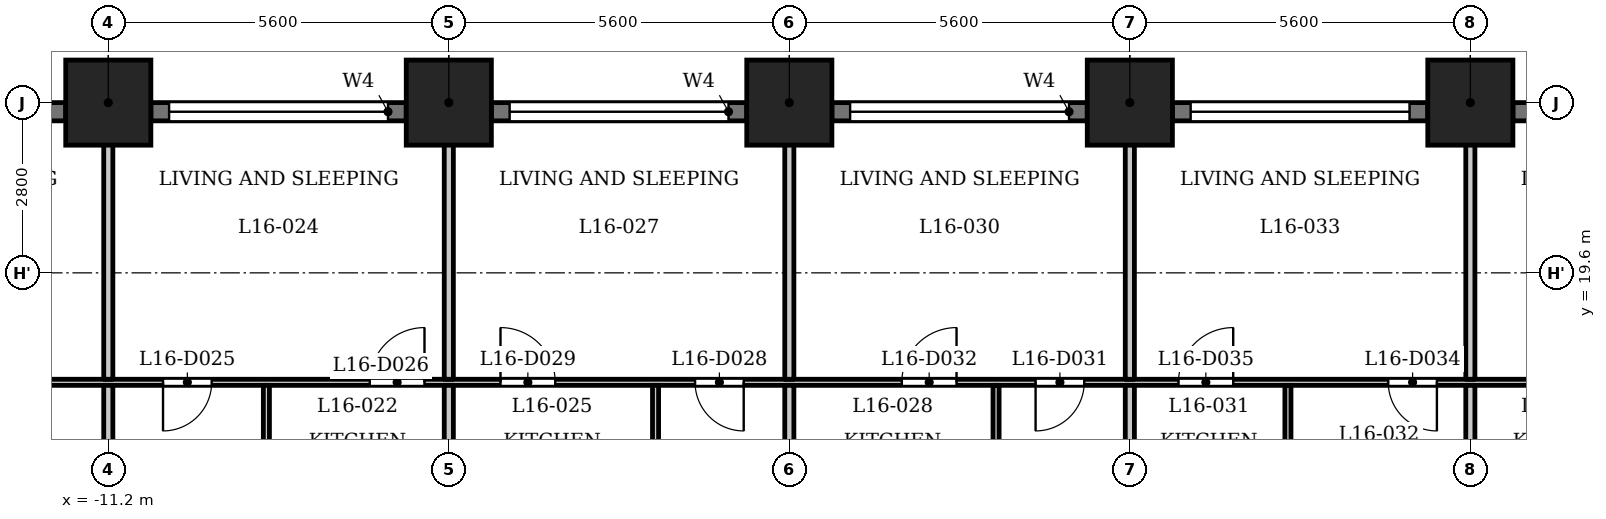
"""IFC4 building model, lengths in metres.
Left out: names, types, materials, properties, quantities, classifications, styles, units other than length and angle.
Written with IfcOpenShell. Run it as: python <this file> out.ifc"""

import sys

from ifc_helpers import new_model, si_unit, direction, frame, frame_2d, origin, origin_2d, place, context, subcontext, project, spatial, rectangle, extrude, element, fill, save


model = new_model("IFC4")
c1 = context("Model", 3, precision=1e-05, world=origin(), true_north=direction((0.0, 1.0)))
c2 = subcontext(c1, "Body", "Model", "MODEL_VIEW")
j1 = project(units=[si_unit("LENGTHUNIT", "METRE"), si_unit("PLANEANGLEUNIT", "RADIAN")], contexts=[c1])
p1 = place(None, origin())
s1 = spatial("IfcSite", under=j1, at=p1, CompositionType="ELEMENT")
p2 = place(p1, origin())
s2 = spatial("IfcBuilding", under=s1, at=p2, CompositionType="ELEMENT")
p3 = place(p2, frame((0.0, 0.0, 65.5)))
s3 = spatial("IfcBuildingStorey", under=s2, at=p3, CompositionType="ELEMENT", Elevation=65.5)
for number, where, z_axis, x_axis in (
    (1, (11.2, 22.4, 0.0), (0.0, 0.0, 1.0), (1.0, 0.0, 0.0)),
    (2, (5.6, 22.4, 0.0), (0.0, 0.0, 1.0), (1.0, 0.0, 0.0)),
    (3, (0.0, 22.4, 0.0), (0.0, 0.0, 1.0), (1.0, 0.0, 0.0)),
    (4, (-5.6, 22.4, 0.0), (0.0, 0.0, 1.0), (1.0, 0.0, 0.0)),
    (5, (-11.2, 22.4, 0.0), (0.0, 0.0, 1.0), (1.0, 0.0, 0.0)),
):
    element("IfcColumn", number, at=place(p3, frame(where, z_axis=z_axis, x_axis=x_axis)), inside=s3, PredefinedType="COLUMN", context=c2, shape_type="SweptSolid", body=[
        extrude(rectangle(XDim=1.4, YDim=1.4, at=origin_2d()), origin(), (0.0, 0.0, 1.0), 3.5),
    ])
p4 = place(p3, frame((16.1, 22.25, 0.0), z_axis=(0.0, 0.0, 1.0), x_axis=(-1.0, 0.0, 0.0)))
e6 = element("IfcWall", 6, at=p4, inside=s3, PredefinedType="SOLIDWALL", context=c2, shape_type="SweptSolid", body=[
    extrude(rectangle(XDim=4.2, YDim=0.3, at=frame_2d((2.1, 0.0))), origin(), (0.0, 0.0, 1.0), 2.35),
])
p5 = place(p4, frame((0.3, 0.0, 1.2)))
e7 = element("IfcOpeningElement", 7, at=p5, cuts=e6, PredefinedType="OPENING", context=c2, shape_type="SweptSolid", body=[
    extrude(rectangle(XDim=3.6, YDim=0.95, at=frame_2d((1.8, 0.475))), frame((0.0, 0.16, 0.0), z_axis=(0.0, -1.0, 0.0), x_axis=(1.0, 0.0, 0.0)), (0.0, 0.0, 1.0), 0.32),
])
p6 = place(p3, frame((10.5, 22.25, 0.0), z_axis=(0.0, 0.0, 1.0), x_axis=(-1.0, 0.0, 0.0)))
e8 = element("IfcWall", 8, at=p6, inside=s3, PredefinedType="SOLIDWALL", context=c2, shape_type="SweptSolid", body=[
    extrude(rectangle(XDim=4.2, YDim=0.3, at=frame_2d((2.1, 0.0))), origin(), (0.0, 0.0, 1.0), 2.35),
])
p7 = place(p6, frame((0.3, 0.0, 1.2)))
e9 = element("IfcOpeningElement", 9, at=p7, cuts=e8, PredefinedType="OPENING", context=c2, shape_type="SweptSolid", body=[
    extrude(rectangle(XDim=3.6, YDim=0.95, at=frame_2d((1.8, 0.475))), frame((0.0, 0.16, 0.0), z_axis=(0.0, -1.0, 0.0), x_axis=(1.0, 0.0, 0.0)), (0.0, 0.0, 1.0), 0.32),
])
p8 = place(p3, frame((4.9, 22.25, 0.0), z_axis=(0.0, 0.0, 1.0), x_axis=(-1.0, 0.0, 0.0)))
e10 = element("IfcWall", 10, at=p8, inside=s3, PredefinedType="SOLIDWALL", context=c2, shape_type="SweptSolid", body=[
    extrude(rectangle(XDim=4.2, YDim=0.3, at=frame_2d((2.1, 0.0))), origin(), (0.0, 0.0, 1.0), 2.35),
])
p9 = place(p8, frame((0.3, 0.0, 1.2)))
e11 = element("IfcOpeningElement", 11, at=p9, cuts=e10, PredefinedType="OPENING", context=c2, shape_type="SweptSolid", body=[
    extrude(rectangle(XDim=3.6, YDim=0.95, at=frame_2d((1.8, 0.475))), frame((0.0, 0.16, 0.0), z_axis=(0.0, -1.0, 0.0), x_axis=(1.0, 0.0, 0.0)), (0.0, 0.0, 1.0), 0.32),
])
p10 = place(p3, frame((-0.7, 22.25, 0.0), z_axis=(0.0, 0.0, 1.0), x_axis=(-1.0, 0.0, 0.0)))
e12 = element("IfcWall", 12, at=p10, inside=s3, PredefinedType="SOLIDWALL", context=c2, shape_type="SweptSolid", body=[
    extrude(rectangle(XDim=4.2, YDim=0.3, at=frame_2d((2.1, 0.0))), origin(), (0.0, 0.0, 1.0), 2.35),
])
p11 = place(p10, frame((0.3, 0.0, 1.2)))
e13 = element("IfcOpeningElement", 13, at=p11, cuts=e12, PredefinedType="OPENING", context=c2, shape_type="SweptSolid", body=[
    extrude(rectangle(XDim=3.6, YDim=0.95, at=frame_2d((1.8, 0.475))), frame((0.0, 0.16, 0.0), z_axis=(0.0, -1.0, 0.0), x_axis=(1.0, 0.0, 0.0)), (0.0, 0.0, 1.0), 0.32),
])
p12 = place(p3, frame((-6.3, 22.25, 0.0), z_axis=(0.0, 0.0, 1.0), x_axis=(-1.0, 0.0, 0.0)))
e14 = element("IfcWall", 14, at=p12, inside=s3, PredefinedType="SOLIDWALL", context=c2, shape_type="SweptSolid", body=[
    extrude(rectangle(XDim=4.2, YDim=0.3, at=frame_2d((2.1, 0.0))), origin(), (0.0, 0.0, 1.0), 2.35),
])
p13 = place(p12, frame((0.3, 0.0, 1.2)))
e15 = element("IfcOpeningElement", 15, at=p13, cuts=e14, PredefinedType="OPENING", context=c2, shape_type="SweptSolid", body=[
    extrude(rectangle(XDim=3.6, YDim=0.95, at=frame_2d((1.8, 0.475))), frame((0.0, 0.16, 0.0), z_axis=(0.0, -1.0, 0.0), x_axis=(1.0, 0.0, 0.0)), (0.0, 0.0, 1.0), 0.32),
])
p14 = place(p3, frame((-11.9, 22.25, 0.0), z_axis=(0.0, 0.0, 1.0), x_axis=(-1.0, 0.0, 0.0)))
e16 = element("IfcWall", 16, at=p14, inside=s3, PredefinedType="SOLIDWALL", context=c2, shape_type="SweptSolid", body=[
    extrude(rectangle(XDim=4.2, YDim=0.3, at=frame_2d((2.1, 0.0))), origin(), (0.0, 0.0, 1.0), 2.35),
])
p15 = place(p14, frame((0.3, 0.0, 1.2)))
e17 = element("IfcOpeningElement", 17, at=p15, cuts=e16, PredefinedType="OPENING", context=c2, shape_type="SweptSolid", body=[
    extrude(rectangle(XDim=3.6, YDim=0.95, at=frame_2d((1.8, 0.475))), frame((0.0, 0.16, 0.0), z_axis=(0.0, -1.0, 0.0), x_axis=(1.0, 0.0, 0.0)), (0.0, 0.0, 1.0), 0.32),
])
p16 = place(p3, frame((-26.64, 17.8, 0.0), z_axis=(0.0, 0.0, 1.0), x_axis=(1.0, 0.0, 0.0)))
e18 = element("IfcWall", 18, at=p16, inside=s3, PredefinedType="PARTITIONING", context=c2, shape_type="SweptSolid", body=[
    extrude(rectangle(XDim=53.034, YDim=0.1, at=frame_2d((26.517, 0.0))), origin(), (0.0, 0.0, 1.0), 3.2),
])
p17 = place(p16, frame((2.872, 0.0, 0.0)))
e19 = element("IfcOpeningElement", 19, at=p17, cuts=e18, PredefinedType="OPENING", context=c2, shape_type="SweptSolid", body=[
    extrude(rectangle(XDim=0.8, YDim=2.1, at=frame_2d((0.4, 1.05))), frame((0.0, 0.06, 0.0), z_axis=(0.0, -1.0, 0.0), x_axis=(1.0, 0.0, 0.0)), (0.0, 0.0, 1.0), 0.12),
])
p18 = place(p16, frame((7.04, 0.0, 0.0)))
e20 = element("IfcOpeningElement", 20, at=p18, cuts=e18, PredefinedType="OPENING", context=c2, shape_type="SweptSolid", body=[
    extrude(rectangle(XDim=0.9, YDim=2.1, at=frame_2d((0.45, 1.05))), frame((0.0, 0.06, 0.0), z_axis=(0.0, -1.0, 0.0), x_axis=(1.0, 0.0, 0.0)), (0.0, 0.0, 1.0), 0.12),
])
p19 = place(p16, frame((10.74, 0.0, 0.0)))
e21 = element("IfcOpeningElement", 21, at=p19, cuts=e18, PredefinedType="OPENING", context=c2, shape_type="SweptSolid", body=[
    extrude(rectangle(XDim=0.8, YDim=2.1, at=frame_2d((0.4, 1.05))), frame((0.0, 0.06, 0.0), z_axis=(0.0, -1.0, 0.0), x_axis=(1.0, 0.0, 0.0)), (0.0, 0.0, 1.0), 0.12),
])
p20 = place(p16, frame((12.89, 0.0, 0.0)))
e22 = element("IfcOpeningElement", 22, at=p20, cuts=e18, PredefinedType="OPENING", context=c2, shape_type="SweptSolid", body=[
    extrude(rectangle(XDim=0.9, YDim=2.1, at=frame_2d((0.45, 1.05))), frame((0.0, 0.06, 0.0), z_axis=(0.0, -1.0, 0.0), x_axis=(1.0, 0.0, 0.0)), (0.0, 0.0, 1.0), 0.12),
])
p21 = place(p16, frame((16.34, 0.0, 0.0)))
e23 = element("IfcOpeningElement", 23, at=p21, cuts=e18, PredefinedType="OPENING", context=c2, shape_type="SweptSolid", body=[
    extrude(rectangle(XDim=0.8, YDim=2.1, at=frame_2d((0.4, 1.05))), frame((0.0, 0.06, 0.0), z_axis=(0.0, -1.0, 0.0), x_axis=(1.0, 0.0, 0.0)), (0.0, 0.0, 1.0), 0.12),
])
p22 = place(p16, frame((19.74, 0.0, 0.0)))
e24 = element("IfcOpeningElement", 24, at=p22, cuts=e18, PredefinedType="OPENING", context=c2, shape_type="SweptSolid", body=[
    extrude(rectangle(XDim=0.9, YDim=2.1, at=frame_2d((0.45, 1.05))), frame((0.0, 0.06, 0.0), z_axis=(0.0, -1.0, 0.0), x_axis=(1.0, 0.0, 0.0)), (0.0, 0.0, 1.0), 0.12),
])
p23 = place(p16, frame((25.09, 0.0, 0.0)))
e25 = element("IfcOpeningElement", 25, at=p23, cuts=e18, PredefinedType="OPENING", context=c2, shape_type="SweptSolid", body=[
    extrude(rectangle(XDim=0.8, YDim=2.1, at=frame_2d((0.4, 1.05))), frame((0.0, 0.06, 0.0), z_axis=(0.0, -1.0, 0.0), x_axis=(1.0, 0.0, 0.0)), (0.0, 0.0, 1.0), 0.12),
])
p24 = place(p16, frame((21.89, 0.0, 0.0)))
e26 = element("IfcOpeningElement", 26, at=p24, cuts=e18, PredefinedType="OPENING", context=c2, shape_type="SweptSolid", body=[
    extrude(rectangle(XDim=0.9, YDim=2.1, at=frame_2d((0.45, 1.05))), frame((0.0, 0.06, 0.0), z_axis=(0.0, -1.0, 0.0), x_axis=(1.0, 0.0, 0.0)), (0.0, 0.0, 1.0), 0.12),
])
p25 = place(p16, frame((30.69, 0.0, 0.0)))
e27 = element("IfcOpeningElement", 27, at=p25, cuts=e18, PredefinedType="OPENING", context=c2, shape_type="SweptSolid", body=[
    extrude(rectangle(XDim=0.8, YDim=2.1, at=frame_2d((0.4, 1.05))), frame((0.0, 0.06, 0.0), z_axis=(0.0, -1.0, 0.0), x_axis=(1.0, 0.0, 0.0)), (0.0, 0.0, 1.0), 0.12),
])
p26 = place(p16, frame((28.49, 0.0, 0.0)))
e28 = element("IfcOpeningElement", 28, at=p26, cuts=e18, PredefinedType="OPENING", context=c2, shape_type="SweptSolid", body=[
    extrude(rectangle(XDim=0.9, YDim=2.1, at=frame_2d((0.45, 1.05))), frame((0.0, 0.06, 0.0), z_axis=(0.0, -1.0, 0.0), x_axis=(1.0, 0.0, 0.0)), (0.0, 0.0, 1.0), 0.12),
])
p27 = place(p16, frame((36.49, 0.0, 0.0)))
e29 = element("IfcOpeningElement", 29, at=p27, cuts=e18, PredefinedType="OPENING", context=c2, shape_type="SweptSolid", body=[
    extrude(rectangle(XDim=0.8, YDim=2.1, at=frame_2d((0.4, 1.05))), frame((0.0, 0.06, 0.0), z_axis=(0.0, -1.0, 0.0), x_axis=(1.0, 0.0, 0.0)), (0.0, 0.0, 1.0), 0.12),
])
p28 = place(p16, frame((33.04, 0.0, 0.0)))
e30 = element("IfcOpeningElement", 30, at=p28, cuts=e18, PredefinedType="OPENING", context=c2, shape_type="SweptSolid", body=[
    extrude(rectangle(XDim=0.9, YDim=2.1, at=frame_2d((0.45, 1.05))), frame((0.0, 0.06, 0.0), z_axis=(0.0, -1.0, 0.0), x_axis=(1.0, 0.0, 0.0)), (0.0, 0.0, 1.0), 0.12),
])
p29 = place(p16, frame((41.49, 0.0, 0.0)))
e31 = element("IfcOpeningElement", 31, at=p29, cuts=e18, PredefinedType="OPENING", context=c2, shape_type="SweptSolid", body=[
    extrude(rectangle(XDim=0.8, YDim=2.1, at=frame_2d((0.4, 1.05))), frame((0.0, 0.06, 0.0), z_axis=(0.0, -1.0, 0.0), x_axis=(1.0, 0.0, 0.0)), (0.0, 0.0, 1.0), 0.12),
])
p30 = place(p16, frame((39.79, 0.0, 0.0)))
e32 = element("IfcOpeningElement", 32, at=p30, cuts=e18, PredefinedType="OPENING", context=c2, shape_type="SweptSolid", body=[
    extrude(rectangle(XDim=0.9, YDim=2.1, at=frame_2d((0.45, 1.05))), frame((0.0, 0.06, 0.0), z_axis=(0.0, -1.0, 0.0), x_axis=(1.0, 0.0, 0.0)), (0.0, 0.0, 1.0), 0.12),
])
p31 = place(p16, frame((51.44, 0.0, 0.0)))
e33 = element("IfcOpeningElement", 33, at=p31, cuts=e18, PredefinedType="OPENING", context=c2, shape_type="SweptSolid", body=[
    extrude(rectangle(XDim=0.8, YDim=2.1, at=frame_2d((0.4, 1.05))), frame((0.0, 0.06, 0.0), z_axis=(0.0, -1.0, 0.0), x_axis=(1.0, 0.0, 0.0)), (0.0, 0.0, 1.0), 0.12),
])
p32 = place(p16, frame((46.49, 0.0, 0.0)))
e34 = element("IfcOpeningElement", 34, at=p32, cuts=e18, PredefinedType="OPENING", context=c2, shape_type="SweptSolid", body=[
    extrude(rectangle(XDim=0.9, YDim=2.1, at=frame_2d((0.45, 1.05))), frame((0.0, 0.06, 0.0), z_axis=(0.0, -1.0, 0.0), x_axis=(1.0, 0.0, 0.0)), (0.0, 0.0, 1.0), 0.12),
])
p33 = place(p3, frame((-11.2, 15.475, 0.0), z_axis=(0.0, 0.0, 1.0), x_axis=(0.0, 1.0, 0.0)))
e35 = element("IfcWall", 35, at=p33, inside=s3, PredefinedType="PARTITIONING", context=c2, shape_type="SweptSolid", body=[
    extrude(rectangle(XDim=2.275, YDim=0.15, at=frame_2d((1.137, 0.0))), origin(), (0.0, 0.0, 1.0), 3.2),
])
p34 = place(p3, frame((-11.2, 17.85, 0.0), z_axis=(0.0, 0.0, 1.0), x_axis=(0.0, 1.0, 0.0)))
e36 = element("IfcWall", 36, at=p34, inside=s3, PredefinedType="PARTITIONING", context=c2, shape_type="SweptSolid", body=[
    extrude(rectangle(XDim=5.23, YDim=0.15, at=frame_2d((2.615, 0.0))), origin(), (0.0, 0.0, 1.0), 3.2),
])
p35 = place(p3, frame((-8.6, 15.475, 0.0), z_axis=(0.0, 0.0, 1.0), x_axis=(0.0, 1.0, 0.0)))
e37 = element("IfcWall", 37, at=p35, inside=s3, PredefinedType="PARTITIONING", context=c2, shape_type="SweptSolid", body=[
    extrude(rectangle(XDim=2.275, YDim=0.1, at=frame_2d((1.137, 0.0))), origin(), (0.0, 0.0, 1.0), 3.2),
])
p36 = place(p3, frame((-5.6, 15.475, 0.0), z_axis=(0.0, 0.0, 1.0), x_axis=(0.0, 1.0, 0.0)))
e38 = element("IfcWall", 38, at=p36, inside=s3, PredefinedType="PARTITIONING", context=c2, shape_type="SweptSolid", body=[
    extrude(rectangle(XDim=2.275, YDim=0.15, at=frame_2d((1.137, 0.0))), origin(), (0.0, 0.0, 1.0), 3.2),
])
p37 = place(p3, frame((-5.6, 17.85, 0.0), z_axis=(0.0, 0.0, 1.0), x_axis=(0.0, 1.0, 0.0)))
e39 = element("IfcWall", 39, at=p37, inside=s3, PredefinedType="PARTITIONING", context=c2, shape_type="SweptSolid", body=[
    extrude(rectangle(XDim=5.23, YDim=0.15, at=frame_2d((2.615, 0.0))), origin(), (0.0, 0.0, 1.0), 3.2),
])
p38 = place(p3, frame((-2.2, 15.475, 0.0), z_axis=(0.0, 0.0, 1.0), x_axis=(0.0, 1.0, 0.0)))
e40 = element("IfcWall", 40, at=p38, inside=s3, PredefinedType="PARTITIONING", context=c2, shape_type="SweptSolid", body=[
    extrude(rectangle(XDim=2.275, YDim=0.1, at=frame_2d((1.137, 0.0))), origin(), (0.0, 0.0, 1.0), 3.2),
])
p39 = place(p3, frame((0.0, 15.475, 0.0), z_axis=(0.0, 0.0, 1.0), x_axis=(0.0, 1.0, 0.0)))
e41 = element("IfcWall", 41, at=p39, inside=s3, PredefinedType="PARTITIONING", context=c2, shape_type="SweptSolid", body=[
    extrude(rectangle(XDim=2.275, YDim=0.15, at=frame_2d((1.137, 0.0))), origin(), (0.0, 0.0, 1.0), 3.2),
])
p40 = place(p3, frame((0.0, 17.85, 0.0), z_axis=(0.0, 0.0, 1.0), x_axis=(0.0, 1.0, 0.0)))
e42 = element("IfcWall", 42, at=p40, inside=s3, PredefinedType="PARTITIONING", context=c2, shape_type="SweptSolid", body=[
    extrude(rectangle(XDim=5.23, YDim=0.15, at=frame_2d((2.615, 0.0))), origin(), (0.0, 0.0, 1.0), 3.2),
])
p41 = place(p3, frame((3.4, 15.475, 0.0), z_axis=(0.0, 0.0, 1.0), x_axis=(0.0, 1.0, 0.0)))
e43 = element("IfcWall", 43, at=p41, inside=s3, PredefinedType="PARTITIONING", context=c2, shape_type="SweptSolid", body=[
    extrude(rectangle(XDim=2.275, YDim=0.1, at=frame_2d((1.137, 0.0))), origin(), (0.0, 0.0, 1.0), 3.2),
])
p42 = place(p3, frame((5.6, 15.475, 0.0), z_axis=(0.0, 0.0, 1.0), x_axis=(0.0, 1.0, 0.0)))
e44 = element("IfcWall", 44, at=p42, inside=s3, PredefinedType="PARTITIONING", context=c2, shape_type="SweptSolid", body=[
    extrude(rectangle(XDim=2.275, YDim=0.15, at=frame_2d((1.137, 0.0))), origin(), (0.0, 0.0, 1.0), 3.2),
])
p43 = place(p3, frame((5.6, 17.85, 0.0), z_axis=(0.0, 0.0, 1.0), x_axis=(0.0, 1.0, 0.0)))
e45 = element("IfcWall", 45, at=p43, inside=s3, PredefinedType="PARTITIONING", context=c2, shape_type="SweptSolid", body=[
    extrude(rectangle(XDim=5.23, YDim=0.15, at=frame_2d((2.615, 0.0))), origin(), (0.0, 0.0, 1.0), 3.2),
])
p44 = place(p3, frame((8.2, 15.475, 0.0), z_axis=(0.0, 0.0, 1.0), x_axis=(0.0, 1.0, 0.0)))
e46 = element("IfcWall", 46, at=p44, inside=s3, PredefinedType="PARTITIONING", context=c2, shape_type="SweptSolid", body=[
    extrude(rectangle(XDim=2.275, YDim=0.1, at=frame_2d((1.137, 0.0))), origin(), (0.0, 0.0, 1.0), 3.2),
])
p45 = place(p3, frame((11.2, 15.475, 0.0), z_axis=(0.0, 0.0, 1.0), x_axis=(0.0, 1.0, 0.0)))
e47 = element("IfcWall", 47, at=p45, inside=s3, PredefinedType="PARTITIONING", context=c2, shape_type="SweptSolid", body=[
    extrude(rectangle(XDim=2.275, YDim=0.15, at=frame_2d((1.137, 0.0))), origin(), (0.0, 0.0, 1.0), 3.2),
])
p46 = place(p3, frame((11.2, 17.85, 0.0), z_axis=(0.0, 0.0, 1.0), x_axis=(0.0, 1.0, 0.0)))
e48 = element("IfcWall", 48, at=p46, inside=s3, PredefinedType="PARTITIONING", context=c2, shape_type="SweptSolid", body=[
    extrude(rectangle(XDim=5.23, YDim=0.15, at=frame_2d((2.615, 0.0))), origin(), (0.0, 0.0, 1.0), 3.2),
])
p47 = place(p21, origin())
e49 = element("IfcDoor", 49, at=p47, inside=s3, OperationType="SINGLE_SWING_LEFT", PredefinedType="DOOR", context=c2, shape_type="SweptSolid", body=[
    extrude(rectangle(XDim=0.8, YDim=2.1, at=frame_2d((0.4, 1.05))), frame((0.0, 0.025, 0.0), z_axis=(0.0, -1.0, 0.0), x_axis=(1.0, 0.0, 0.0)), (0.0, 0.0, 1.0), 0.05),
])
fill(e23, e49)
p48 = place(p22, origin())
e50 = element("IfcDoor", 50, at=p48, inside=s3, OperationType="SINGLE_SWING_LEFT", PredefinedType="DOOR", context=c2, shape_type="SweptSolid", body=[
    extrude(rectangle(XDim=0.9, YDim=2.1, at=frame_2d((0.45, 1.05))), frame((0.0, 0.025, 0.0), z_axis=(0.0, -1.0, 0.0), x_axis=(1.0, 0.0, 0.0)), (0.0, 0.0, 1.0), 0.05),
])
fill(e24, e50)
p49 = place(p23, origin())
e51 = element("IfcDoor", 51, at=p49, inside=s3, OperationType="SINGLE_SWING_RIGHT", PredefinedType="DOOR", context=c2, shape_type="SweptSolid", body=[
    extrude(rectangle(XDim=0.8, YDim=2.1, at=frame_2d((0.4, 1.05))), frame((0.0, 0.025, 0.0), z_axis=(0.0, -1.0, 0.0), x_axis=(1.0, 0.0, 0.0)), (0.0, 0.0, 1.0), 0.05),
])
fill(e25, e51)
p50 = place(p24, origin())
e52 = element("IfcDoor", 52, at=p50, inside=s3, OperationType="SINGLE_SWING_RIGHT", PredefinedType="DOOR", context=c2, shape_type="SweptSolid", body=[
    extrude(rectangle(XDim=0.9, YDim=2.1, at=frame_2d((0.45, 1.05))), frame((0.0, 0.025, 0.0), z_axis=(0.0, -1.0, 0.0), x_axis=(1.0, 0.0, 0.0)), (0.0, 0.0, 1.0), 0.05),
])
fill(e26, e52)
p51 = place(p25, origin())
e53 = element("IfcDoor", 53, at=p51, inside=s3, OperationType="SINGLE_SWING_LEFT", PredefinedType="DOOR", context=c2, shape_type="SweptSolid", body=[
    extrude(rectangle(XDim=0.8, YDim=2.1, at=frame_2d((0.4, 1.05))), frame((0.0, 0.025, 0.0), z_axis=(0.0, -1.0, 0.0), x_axis=(1.0, 0.0, 0.0)), (0.0, 0.0, 1.0), 0.05),
])
fill(e27, e53)
p52 = place(p26, origin())
e54 = element("IfcDoor", 54, at=p52, inside=s3, OperationType="SINGLE_SWING_LEFT", PredefinedType="DOOR", context=c2, shape_type="SweptSolid", body=[
    extrude(rectangle(XDim=0.9, YDim=2.1, at=frame_2d((0.45, 1.05))), frame((0.0, 0.025, 0.0), z_axis=(0.0, -1.0, 0.0), x_axis=(1.0, 0.0, 0.0)), (0.0, 0.0, 1.0), 0.05),
])
fill(e28, e54)
p53 = place(p27, origin())
e55 = element("IfcDoor", 55, at=p53, inside=s3, OperationType="SINGLE_SWING_RIGHT", PredefinedType="DOOR", context=c2, shape_type="SweptSolid", body=[
    extrude(rectangle(XDim=0.8, YDim=2.1, at=frame_2d((0.4, 1.05))), frame((0.0, 0.025, 0.0), z_axis=(0.0, -1.0, 0.0), x_axis=(1.0, 0.0, 0.0)), (0.0, 0.0, 1.0), 0.05),
])
fill(e29, e55)
p54 = place(p28, origin())
e56 = element("IfcDoor", 56, at=p54, inside=s3, OperationType="SINGLE_SWING_LEFT", PredefinedType="DOOR", context=c2, shape_type="SweptSolid", body=[
    extrude(rectangle(XDim=0.9, YDim=2.1, at=frame_2d((0.45, 1.05))), frame((0.0, 0.025, 0.0), z_axis=(0.0, -1.0, 0.0), x_axis=(1.0, 0.0, 0.0)), (0.0, 0.0, 1.0), 0.05),
])
fill(e30, e56)
p55 = place(p7, origin())
e57 = element("IfcWindow", 57, at=p55, inside=s3, PartitioningType="SINGLE_PANEL", PredefinedType="WINDOW", context=c2, shape_type="SweptSolid", body=[
    extrude(rectangle(XDim=3.6, YDim=0.95, at=frame_2d((1.8, 0.475))), frame((0.0, 0.03, 0.0), z_axis=(0.0, -1.0, 0.0), x_axis=(1.0, 0.0, 0.0)), (0.0, 0.0, 1.0), 0.06),
])
fill(e9, e57)
p56 = place(p9, origin())
e58 = element("IfcWindow", 58, at=p56, inside=s3, PartitioningType="SINGLE_PANEL", PredefinedType="WINDOW", context=c2, shape_type="SweptSolid", body=[
    extrude(rectangle(XDim=3.6, YDim=0.95, at=frame_2d((1.8, 0.475))), frame((0.0, 0.03, 0.0), z_axis=(0.0, -1.0, 0.0), x_axis=(1.0, 0.0, 0.0)), (0.0, 0.0, 1.0), 0.06),
])
fill(e11, e58)
p57 = place(p11, origin())
e59 = element("IfcWindow", 59, at=p57, inside=s3, PartitioningType="SINGLE_PANEL", PredefinedType="WINDOW", context=c2, shape_type="SweptSolid", body=[
    extrude(rectangle(XDim=3.6, YDim=0.95, at=frame_2d((1.8, 0.475))), frame((0.0, 0.03, 0.0), z_axis=(0.0, -1.0, 0.0), x_axis=(1.0, 0.0, 0.0)), (0.0, 0.0, 1.0), 0.06),
])
fill(e13, e59)
p58 = place(p13, origin())
e60 = element("IfcWindow", 60, at=p58, inside=s3, PartitioningType="SINGLE_PANEL", PredefinedType="WINDOW", context=c2, shape_type="SweptSolid", body=[
    extrude(rectangle(XDim=3.6, YDim=0.95, at=frame_2d((1.8, 0.475))), frame((0.0, 0.03, 0.0), z_axis=(0.0, -1.0, 0.0), x_axis=(1.0, 0.0, 0.0)), (0.0, 0.0, 1.0), 0.06),
])
fill(e15, e60)
save(model, sys.argv[1])
